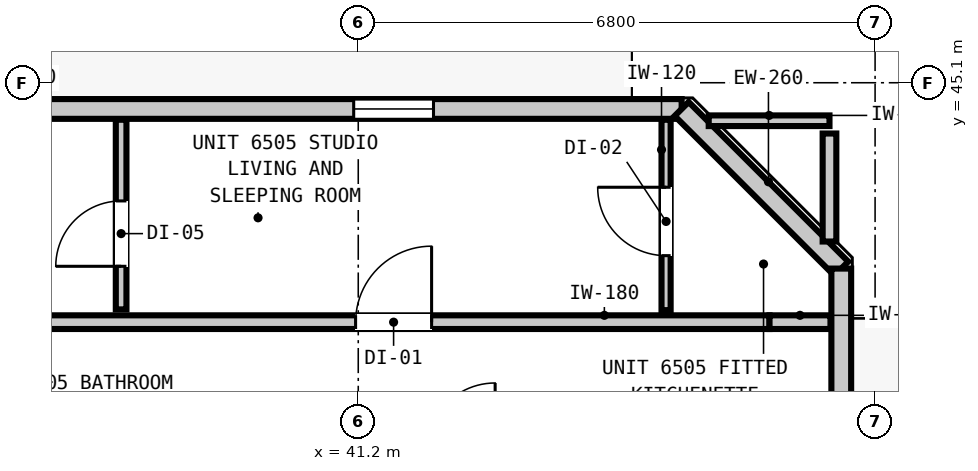
"""IFC4 building model, lengths in metres.
Left out: names, types, materials, properties, quantities, classifications, styles, units other than length and angle.
Written with IfcOpenShell. Run it as: python <this file> out.ifc"""

import sys

from ifc_helpers import new_model, si_unit, direction, frame, frame_2d, origin, place, context, subcontext, project, spatial, rectangle, extrude, element, fill, save


model = new_model("IFC4")
c1 = context("Model", 3, precision=1e-05, world=origin(), true_north=direction((0.0, 1.0)))
c2 = subcontext(c1, "Body", "Model", "MODEL_VIEW")
j1 = project(units=[si_unit("LENGTHUNIT", "METRE"), si_unit("PLANEANGLEUNIT", "RADIAN")], contexts=[c1])
p1 = place(None, origin())
s1 = spatial("IfcSite", under=j1, at=p1, CompositionType="ELEMENT")
p2 = place(p1, origin())
s2 = spatial("IfcBuilding", under=s1, at=p2, CompositionType="ELEMENT")
p3 = place(p2, frame((0.0, 0.0, 223.36)))
s3 = spatial("IfcBuildingStorey", under=s2, at=p3, CompositionType="ELEMENT", Elevation=223.36)
p4 = place(p3, frame((12.745, 44.755, 0.0), z_axis=(0.0, 0.0, 1.0), x_axis=(1.0, 0.0, 0.0)))
e1 = element("IfcWall", 1, at=p4, inside=s3, PredefinedType="STANDARD", context=c2, shape_type="SweptSolid", body=[
    extrude(rectangle(XDim=32.71, YDim=0.26, at=frame_2d((16.355, 0.0))), origin(), (0.0, 0.0, 1.0), 2.92),
])
p5 = place(p4, frame((2.665, 0.0, 0.0)))
e2 = element("IfcOpeningElement", 2, at=p5, cuts=e1, PredefinedType="OPENING", context=c2, shape_type="SweptSolid", body=[
    extrude(rectangle(XDim=1.0, YDim=2.15, at=frame_2d((0.5, 1.075))), frame((0.0, 0.14, 0.0), z_axis=(0.0, -1.0, 0.0), x_axis=(1.0, 0.0, 0.0)), (0.0, 0.0, 1.0), 0.28),
])
p6 = place(p4, frame((10.605, 0.0, 0.85)))
e3 = element("IfcOpeningElement", 3, at=p6, cuts=e1, PredefinedType="OPENING", context=c2, shape_type="SweptSolid", body=[
    extrude(rectangle(XDim=1.05, YDim=1.65, at=frame_2d((0.525, 0.825))), frame((0.0, 0.14, 0.0), z_axis=(0.0, -1.0, 0.0), x_axis=(1.0, 0.0, 0.0)), (0.0, 0.0, 1.0), 0.28),
])
p7 = place(p4, frame((18.585, 0.0, 0.85)))
e4 = element("IfcOpeningElement", 4, at=p7, cuts=e1, PredefinedType="OPENING", context=c2, shape_type="SweptSolid", body=[
    extrude(rectangle(XDim=1.05, YDim=1.65, at=frame_2d((0.525, 0.825))), frame((0.0, 0.14, 0.0), z_axis=(0.0, -1.0, 0.0), x_axis=(1.0, 0.0, 0.0)), (0.0, 0.0, 1.0), 0.28),
])
p8 = place(p4, frame((28.395, 0.0, 0.85)))
e5 = element("IfcOpeningElement", 5, at=p8, cuts=e1, PredefinedType="OPENING", context=c2, shape_type="SweptSolid", body=[
    extrude(rectangle(XDim=1.05, YDim=1.65, at=frame_2d((0.525, 0.825))), frame((0.0, 0.14, 0.0), z_axis=(0.0, -1.0, 0.0), x_axis=(1.0, 0.0, 0.0)), (0.0, 0.0, 1.0), 0.28),
])
p9 = place(p3, frame((45.455, 44.755, 0.0), z_axis=(0.0, 0.0, 1.0), x_axis=(0.707106781187, -0.707106781187, 0.0)))
e6 = element("IfcWall", 6, at=p9, inside=s3, PredefinedType="STANDARD", context=c2, shape_type="SweptSolid", body=[
    extrude(rectangle(XDim=2.97, YDim=0.26, at=frame_2d((1.485, 0.0))), origin(), (0.0, 0.0, 1.0), 2.92),
])
p10 = place(p3, frame((47.555, 42.655, 0.0), z_axis=(0.0, 0.0, 1.0), x_axis=(0.0, -1.0, 0.0)))
e7 = element("IfcWall", 7, at=p10, inside=s3, PredefinedType="STANDARD", context=c2, shape_type="SweptSolid", body=[
    extrude(rectangle(XDim=30.31, YDim=0.26, at=frame_2d((15.155, 0.0))), origin(), (0.0, 0.0, 1.0), 2.92),
])
p11 = place(p10, frame((4.082, 0.0, 0.0)))
e8 = element("IfcOpeningElement", 8, at=p11, cuts=e7, PredefinedType="OPENING", context=c2, shape_type="SweptSolid", body=[
    extrude(rectangle(XDim=1.0, YDim=2.15, at=frame_2d((0.5, 1.075))), frame((0.0, 0.14, 0.0), z_axis=(0.0, -1.0, 0.0), x_axis=(1.0, 0.0, 0.0)), (0.0, 0.0, 1.0), 0.28),
])
p12 = place(p10, frame((26.238, 0.0, 0.85)))
e9 = element("IfcOpeningElement", 9, at=p12, cuts=e7, PredefinedType="OPENING", context=c2, shape_type="SweptSolid", body=[
    extrude(rectangle(XDim=1.05, YDim=1.65, at=frame_2d((0.525, 0.825))), frame((0.0, 0.14, 0.0), z_axis=(0.0, -1.0, 0.0), x_axis=(1.0, 0.0, 0.0)), (0.0, 0.0, 1.0), 0.28),
])
p13 = place(p3, frame((36.889, 41.95, 0.0), z_axis=(0.0, 0.0, 1.0), x_axis=(1.0, 0.0, 0.0)))
e10 = element("IfcWall", 10, at=p13, inside=s3, PredefinedType="PARTITIONING", context=c2, shape_type="SweptSolid", body=[
    extrude(rectangle(XDim=9.722, YDim=0.18, at=frame_2d((4.861, 0.0))), origin(), (0.0, 0.0, 1.0), 2.297),
])
p14 = place(p13, frame((4.276, 0.0, 0.0)))
e11 = element("IfcOpeningElement", 11, at=p14, cuts=e10, PredefinedType="OPENING", context=c2, shape_type="SweptSolid", body=[
    extrude(rectangle(XDim=1.0, YDim=2.15, at=frame_2d((0.5, 1.075))), frame((0.0, 0.1, 0.0), z_axis=(0.0, -1.0, 0.0), x_axis=(1.0, 0.0, 0.0)), (0.0, 0.0, 1.0), 0.2),
])
p15 = place(p3, frame((46.611, 41.95, 0.0), z_axis=(0.0, 0.0, 1.0), x_axis=(1.0, 0.0, 0.0)))
e12 = element("IfcWall", 12, at=p15, inside=s3, PredefinedType="PARTITIONING", context=c2, shape_type="SweptSolid", body=[
    extrude(rectangle(XDim=0.802, YDim=0.18, at=frame_2d((0.401, 0.0))), origin(), (0.0, 0.0, 1.0), 2.92),
])
p16 = place(p3, frame((45.811, 44.6, 0.0), z_axis=(0.0, 0.0, 1.0), x_axis=(1.0, 0.0, 0.0)))
e13 = element("IfcWall", 13, at=p16, inside=s3, PredefinedType="PARTITIONING", context=c2, shape_type="SweptSolid", body=[
    extrude(rectangle(XDim=1.589, YDim=0.14, at=frame_2d((0.794, 0.0))), origin(), (0.0, 0.0, 1.0), 2.92),
])
p17 = place(p3, frame((47.4, 43.011, 0.0), z_axis=(0.0, 0.0, 1.0), x_axis=(0.0, 1.0, 0.0)))
e14 = element("IfcWall", 14, at=p17, inside=s3, PredefinedType="PARTITIONING", context=c2, shape_type="SweptSolid", body=[
    extrude(rectangle(XDim=1.421, YDim=0.18, at=frame_2d((0.71, 0.0))), origin(), (0.0, 0.0, 1.0), 2.92),
])
p18 = place(p3, frame((38.08, 42.118, 0.0), z_axis=(0.0, 0.0, 1.0), x_axis=(0.0, 1.0, 0.0)))
e15 = element("IfcWall", 15, at=p18, inside=s3, PredefinedType="PARTITIONING", context=c2, shape_type="SweptSolid", body=[
    extrude(rectangle(XDim=2.495, YDim=0.14, at=frame_2d((1.248, 0.0))), origin(), (0.0, 0.0, 1.0), 2.92),
])
p19 = place(p18, frame((0.567, 0.0, 0.0)))
e16 = element("IfcOpeningElement", 16, at=p19, cuts=e15, PredefinedType="OPENING", context=c2, shape_type="SweptSolid", body=[
    extrude(rectangle(XDim=0.86, YDim=2.02, at=frame_2d((0.43, 1.01))), frame((0.0, 0.08, 0.0), z_axis=(0.0, -1.0, 0.0), x_axis=(1.0, 0.0, 0.0)), (0.0, 0.0, 1.0), 0.16),
])
p20 = place(p3, frame((45.25, 42.108, 0.0), z_axis=(0.0, 0.0, 1.0), x_axis=(0.0, 1.0, 0.0)))
e17 = element("IfcWall", 17, at=p20, inside=s3, PredefinedType="PARTITIONING", context=c2, shape_type="SweptSolid", body=[
    extrude(rectangle(XDim=2.505, YDim=0.12, at=frame_2d((1.252, 0.0))), origin(), (0.0, 0.0, 1.0), 2.92),
])
p21 = place(p20, frame((0.717, 0.0, 0.0)))
e18 = element("IfcOpeningElement", 18, at=p21, cuts=e17, PredefinedType="OPENING", context=c2, shape_type="SweptSolid", body=[
    extrude(rectangle(XDim=0.9, YDim=2.1, at=frame_2d((0.45, 1.05))), frame((0.0, 0.07, 0.0), z_axis=(0.0, -1.0, 0.0), x_axis=(1.0, 0.0, 0.0)), (0.0, 0.0, 1.0), 0.14),
])
p22 = place(p8, origin())
e19 = element("IfcWindow", 19, at=p22, inside=s3, PartitioningType="SINGLE_PANEL", PredefinedType="WINDOW", context=c2, shape_type="SweptSolid", body=[
    extrude(rectangle(XDim=1.05, YDim=1.65, at=frame_2d((0.525, 0.825))), frame((0.0, 0.03, 0.0), z_axis=(0.0, -1.0, 0.0), x_axis=(1.0, 0.0, 0.0)), (0.0, 0.0, 1.0), 0.06),
])
fill(e5, e19)
p23 = place(p14, origin())
e20 = element("IfcDoor", 20, at=p23, inside=s3, OperationType="SINGLE_SWING_RIGHT", PredefinedType="DOOR", context=c2, shape_type="SweptSolid", body=[
    extrude(rectangle(XDim=1.0, YDim=2.15, at=frame_2d((0.5, 1.075))), frame((0.0, 0.025, 0.0), z_axis=(0.0, -1.0, 0.0), x_axis=(1.0, 0.0, 0.0)), (0.0, 0.0, 1.0), 0.05),
])
fill(e11, e20)
p24 = place(p19, origin())
e21 = element("IfcDoor", 21, at=p24, inside=s3, OperationType="SINGLE_SWING_LEFT", PredefinedType="DOOR", context=c2, shape_type="SweptSolid", body=[
    extrude(rectangle(XDim=0.86, YDim=2.02, at=frame_2d((0.43, 1.01))), frame((0.0, 0.025, 0.0), z_axis=(0.0, -1.0, 0.0), x_axis=(1.0, 0.0, 0.0)), (0.0, 0.0, 1.0), 0.05),
])
fill(e16, e21)
p25 = place(p21, origin())
e22 = element("IfcDoor", 22, at=p25, inside=s3, OperationType="SINGLE_SWING_RIGHT", PredefinedType="DOOR", context=c2, shape_type="SweptSolid", body=[
    extrude(rectangle(XDim=0.9, YDim=2.1, at=frame_2d((0.45, 1.05))), frame((0.0, 0.025, 0.0), z_axis=(0.0, -1.0, 0.0), x_axis=(1.0, 0.0, 0.0)), (0.0, 0.0, 1.0), 0.05),
])
fill(e18, e22)
save(model, sys.argv[1])
